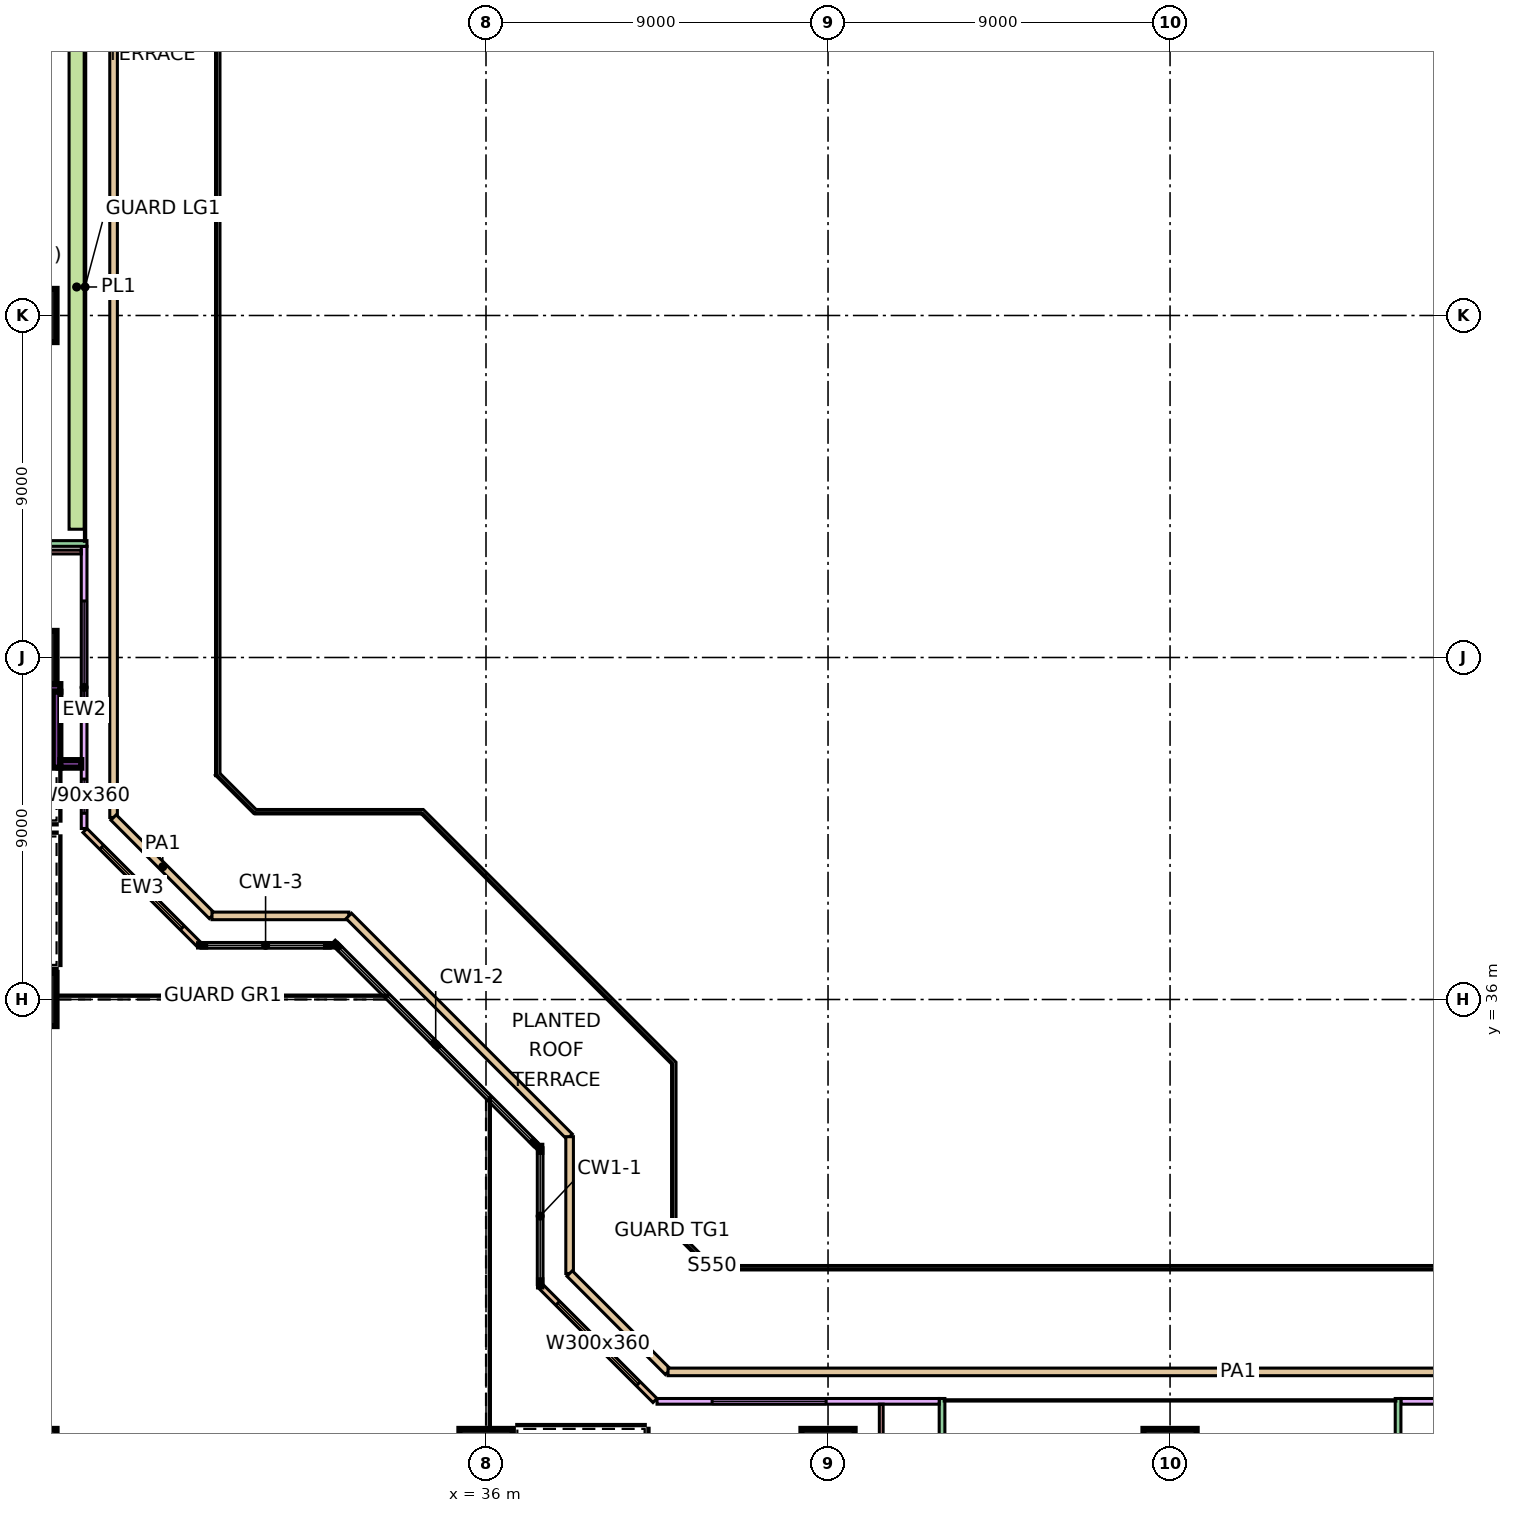
"""IFC4 building model, lengths in metres.
Left out: names, types, materials, properties, quantities, classifications, styles, units other than length and angle.
Written with IfcOpenShell. Run it as: python <this file> out.ifc"""

import sys

from ifc_helpers import new_model, si_unit, direction, frame, frame_2d, origin, origin_2d, place, context, subcontext, project, spatial, rectangle, extrude, element, fill, save


model = new_model("IFC4")
c1 = context("Model", 3, precision=1e-05, world=origin(), true_north=direction((0.0, 1.0)))
c2 = subcontext(c1, "Body", "Model", "MODEL_VIEW")
j1 = project(units=[si_unit("LENGTHUNIT", "METRE"), si_unit("PLANEANGLEUNIT", "RADIAN")], contexts=[c1])
p1 = place(None, origin())
s1 = spatial("IfcSite", under=j1, at=p1, CompositionType="ELEMENT")
p2 = place(p1, origin())
s2 = spatial("IfcBuilding", under=s1, at=p2, CompositionType="ELEMENT")
p3 = place(p2, frame((0.0, 0.0, 35.4)))
s3 = spatial("IfcBuildingStorey", under=s2, at=p3, CompositionType="ELEMENT", Elevation=35.4)
for number, where, z_axis, x_axis in (
    (1, (24.0, 24.0, 0.0), (0.0, 0.0, 1.0), (1.0, 0.0, 0.0)),
    (2, (24.0, 36.0, 0.0), (0.0, 0.0, 1.0), (1.0, 0.0, 0.0)),
    (3, (24.0, 45.0, 0.0), (0.0, 0.0, 1.0), (1.0, 0.0, 0.0)),
    (4, (24.0, 54.0, 0.0), (0.0, 0.0, 1.0), (1.0, 0.0, 0.0)),
    (5, (36.0, 24.0, 0.0), (0.0, 0.0, 1.0), (1.0, 0.0, 0.0)),
    (6, (45.0, 24.0, 0.0), (0.0, 0.0, 1.0), (1.0, 0.0, 0.0)),
    (7, (54.0, 24.0, 0.0), (0.0, 0.0, 1.0), (1.0, 0.0, 0.0)),
):
    element("IfcColumn", number, at=place(p3, frame(where, z_axis=z_axis, x_axis=x_axis)), inside=s3, PredefinedType="COLUMN", context=c2, shape_type="SweptSolid", body=[
        extrude(rectangle(XDim=1.4, YDim=1.4, at=origin_2d()), origin(), (0.0, 0.0, 1.0), 6.0),
    ])
p4 = place(p3, frame((70.5, 25.425, 0.0), z_axis=(0.0, 0.0, 1.0), x_axis=(-1.0, 0.0, 0.0)))
e8 = element("IfcWall", 8, at=p4, inside=s3, PredefinedType="SOLIDWALL", context=c2, shape_type="SweptSolid", body=[
    extrude(rectangle(XDim=10.425, YDim=0.15, at=frame_2d((5.212, 0.0))), origin(), (0.0, 0.0, 1.0), 5.6),
])
p5 = place(p4, frame((1.25, 0.0, 0.45)))
e9 = element("IfcOpeningElement", 9, at=p5, cuts=e8, PredefinedType="OPENING", context=c2, shape_type="SweptSolid", body=[
    extrude(rectangle(XDim=3.0, YDim=3.6, at=frame_2d((1.5, 1.8))), frame((0.0, 0.085, 0.0), z_axis=(0.0, -1.0, 0.0), x_axis=(1.0, 0.0, 0.0)), (0.0, 0.0, 1.0), 0.17),
])
p6 = place(p4, frame((6.462, 0.0, 0.45)))
e10 = element("IfcOpeningElement", 10, at=p6, cuts=e8, PredefinedType="OPENING", context=c2, shape_type="SweptSolid", body=[
    extrude(rectangle(XDim=3.0, YDim=3.6, at=frame_2d((1.5, 1.8))), frame((0.0, 0.085, 0.0), z_axis=(0.0, -1.0, 0.0), x_axis=(1.0, 0.0, 0.0)), (0.0, 0.0, 1.0), 0.17),
])
for number, where, z_axis, x_axis in (
    (11, (60.0, 25.5, 0.0), (0.0, 0.0, 1.0), (0.0, -1.0, 0.0)),
    (12, (48.0, 25.5, 0.0), (0.0, 0.0, 1.0), (0.0, -1.0, 0.0)),
):
    element("IfcWall", number, at=place(p3, frame(where, z_axis=z_axis, x_axis=x_axis)), inside=s3, PredefinedType="SOLIDWALL", context=c2, shape_type="SweptSolid", body=[
        extrude(rectangle(XDim=1.5, YDim=0.15, at=frame_2d((0.75, 0.0))), origin(), (0.0, 0.0, 1.0), 5.6),
    ])
p7 = place(p3, frame((47.925, 25.425, 0.0), z_axis=(0.0, 0.0, 1.0), x_axis=(-1.0, 0.0, 0.0)))
e13 = element("IfcWall", 13, at=p7, inside=s3, PredefinedType="SOLIDWALL", context=c2, shape_type="SweptSolid", body=[
    extrude(rectangle(XDim=7.425, YDim=0.15, at=frame_2d((3.712, 0.0))), origin(), (0.0, 0.0, 1.0), 5.6),
])
p8 = place(p7, frame((2.975, 0.0, 0.45)))
e14 = element("IfcOpeningElement", 14, at=p8, cuts=e13, PredefinedType="OPENING", context=c2, shape_type="SweptSolid", body=[
    extrude(rectangle(XDim=3.0, YDim=3.6, at=frame_2d((1.5, 1.8))), frame((0.0, 0.085, 0.0), z_axis=(0.0, -1.0, 0.0), x_axis=(1.0, 0.0, 0.0)), (0.0, 0.0, 1.0), 0.17),
])
p9 = place(p3, frame((40.447, 25.447, 0.0), z_axis=(0.0, 0.0, 1.0), x_axis=(-0.707106781187, 0.707106781187, 0.0)))
e15 = element("IfcWall", 15, at=p9, inside=s3, PredefinedType="SOLIDWALL", context=c2, shape_type="SweptSolid", body=[
    extrude(rectangle(XDim=4.243, YDim=0.15, at=frame_2d((2.121, 0.0))), origin(), (0.0, 0.0, 1.0), 5.6),
])
p10 = place(p9, frame((0.621, 0.0, 0.45)))
e16 = element("IfcOpeningElement", 16, at=p10, cuts=e15, PredefinedType="OPENING", context=c2, shape_type="SweptSolid", body=[
    extrude(rectangle(XDim=3.0, YDim=3.6, at=frame_2d((1.5, 1.8))), frame((0.0, 0.085, 0.0), z_axis=(0.0, -1.0, 0.0), x_axis=(1.0, 0.0, 0.0)), (0.0, 0.0, 1.0), 0.17),
])
p11 = place(p3, frame((28.447, 37.447, 0.0), z_axis=(0.0, 0.0, 1.0), x_axis=(-0.707106781187, 0.707106781187, 0.0)))
e17 = element("IfcWall", 17, at=p11, inside=s3, PredefinedType="SOLIDWALL", context=c2, shape_type="SweptSolid", body=[
    extrude(rectangle(XDim=4.243, YDim=0.15, at=frame_2d((2.121, 0.0))), origin(), (0.0, 0.0, 1.0), 5.6),
])
p12 = place(p11, frame((0.621, 0.0, 0.45)))
e18 = element("IfcOpeningElement", 18, at=p12, cuts=e17, PredefinedType="OPENING", context=c2, shape_type="SweptSolid", body=[
    extrude(rectangle(XDim=3.0, YDim=3.6, at=frame_2d((1.5, 1.8))), frame((0.0, 0.085, 0.0), z_axis=(0.0, -1.0, 0.0), x_axis=(1.0, 0.0, 0.0)), (0.0, 0.0, 1.0), 0.17),
])
p13 = place(p3, frame((25.425, 40.5, 0.0), z_axis=(0.0, 0.0, 1.0), x_axis=(0.0, 1.0, 0.0)))
e19 = element("IfcWall", 19, at=p13, inside=s3, PredefinedType="SOLIDWALL", context=c2, shape_type="SweptSolid", body=[
    extrude(rectangle(XDim=7.425, YDim=0.15, at=frame_2d((3.712, 0.0))), origin(), (0.0, 0.0, 1.0), 5.6),
])
p14 = place(p13, frame((0.4, 0.0, 0.45)))
e20 = element("IfcOpeningElement", 20, at=p14, cuts=e19, PredefinedType="OPENING", context=c2, shape_type="SweptSolid", body=[
    extrude(rectangle(XDim=0.9, YDim=3.6, at=frame_2d((0.45, 1.8))), frame((0.0, 0.085, 0.0), z_axis=(0.0, -1.0, 0.0), x_axis=(1.0, 0.0, 0.0)), (0.0, 0.0, 1.0), 0.17),
])
p15 = place(p13, frame((2.988, 0.0, 0.45)))
e21 = element("IfcOpeningElement", 21, at=p15, cuts=e19, PredefinedType="OPENING", context=c2, shape_type="SweptSolid", body=[
    extrude(rectangle(XDim=3.0, YDim=3.6, at=frame_2d((1.5, 1.8))), frame((0.0, 0.085, 0.0), z_axis=(0.0, -1.0, 0.0), x_axis=(1.0, 0.0, 0.0)), (0.0, 0.0, 1.0), 0.17),
])
p16 = place(p3, frame((25.5, 48.0, 0.0), z_axis=(0.0, 0.0, 1.0), x_axis=(-1.0, 0.0, 0.0)))
e22 = element("IfcWall", 22, at=p16, inside=s3, PredefinedType="SOLIDWALL", context=c2, shape_type="SweptSolid", body=[
    extrude(rectangle(XDim=1.5, YDim=0.15, at=frame_2d((0.75, 0.0))), origin(), (0.0, 0.0, 1.0), 5.6),
])
p17 = place(p3, frame((25.229, 48.375, 0.0), z_axis=(0.0, 0.0, 1.0), x_axis=(0.0, 1.0, 0.0)))
e23 = element("IfcWall", 23, at=p17, inside=s3, PredefinedType="SOLIDWALL", context=c2, shape_type="SweptSolid", body=[
    extrude(rectangle(XDim=12.75, YDim=0.4, at=frame_2d((6.375, 0.0))), origin(), (0.0, 0.0, 1.0), 0.7),
])
p18 = place(p3, frame((26.2, 61.79, 0.0), z_axis=(0.0, 0.0, 1.0), x_axis=(0.0, -1.0, 0.0)))
e24 = element("IfcWall", 24, at=p18, inside=s3, PredefinedType="PARAPET", context=c2, shape_type="SweptSolid", body=[
    extrude(rectangle(XDim=21.0, YDim=0.2, at=frame_2d((10.5, 0.0))), origin(), (0.0, 0.0, 1.0), 0.5),
])
p19 = place(p3, frame((26.2, 40.79, 0.0), z_axis=(0.0, 0.0, 1.0), x_axis=(0.707106781187, -0.707106781187, 0.0)))
e25 = element("IfcWall", 25, at=p19, inside=s3, PredefinedType="PARAPET", context=c2, shape_type="SweptSolid", body=[
    extrude(rectangle(XDim=3.663, YDim=0.2, at=frame_2d((1.832, 0.0))), origin(), (0.0, 0.0, 1.0), 0.5),
])
p20 = place(p3, frame((28.79, 38.2, 0.0), z_axis=(0.0, 0.0, 1.0), x_axis=(1.0, 0.0, 0.0)))
e26 = element("IfcWall", 26, at=p20, inside=s3, PredefinedType="PARAPET", context=c2, shape_type="SweptSolid", body=[
    extrude(rectangle(XDim=3.6, YDim=0.2, at=frame_2d((1.8, 0.0))), origin(), (0.0, 0.0, 1.0), 0.5),
])
p21 = place(p3, frame((32.39, 38.2, 0.0), z_axis=(0.0, 0.0, 1.0), x_axis=(0.707106781187, -0.707106781187, 0.0)))
e27 = element("IfcWall", 27, at=p21, inside=s3, PredefinedType="PARAPET", context=c2, shape_type="SweptSolid", body=[
    extrude(rectangle(XDim=8.217, YDim=0.2, at=frame_2d((4.108, 0.0))), origin(), (0.0, 0.0, 1.0), 0.5),
])
p22 = place(p3, frame((38.2, 32.39, 0.0), z_axis=(0.0, 0.0, 1.0), x_axis=(0.0, -1.0, 0.0)))
e28 = element("IfcWall", 28, at=p22, inside=s3, PredefinedType="PARAPET", context=c2, shape_type="SweptSolid", body=[
    extrude(rectangle(XDim=3.6, YDim=0.2, at=frame_2d((1.8, 0.0))), origin(), (0.0, 0.0, 1.0), 0.5),
])
p23 = place(p3, frame((38.2, 28.79, 0.0), z_axis=(0.0, 0.0, 1.0), x_axis=(0.707106781187, -0.707106781187, 0.0)))
e29 = element("IfcWall", 29, at=p23, inside=s3, PredefinedType="PARAPET", context=c2, shape_type="SweptSolid", body=[
    extrude(rectangle(XDim=3.663, YDim=0.2, at=frame_2d((1.832, 0.0))), origin(), (0.0, 0.0, 1.0), 0.5),
])
p24 = place(p3, frame((40.79, 26.2, 0.0), z_axis=(0.0, 0.0, 1.0), x_axis=(1.0, 0.0, 0.0)))
e30 = element("IfcWall", 30, at=p24, inside=s3, PredefinedType="PARAPET", context=c2, shape_type="SweptSolid", body=[
    extrude(rectangle(XDim=30.0, YDim=0.2, at=frame_2d((15.0, 0.0))), origin(), (0.0, 0.0, 1.0), 0.5),
])
p25 = place(p3, frame((15.1, 44.2, 0.0), z_axis=(0.0, 0.0, 1.0), x_axis=(1.0, 0.0, 0.0)))
e31 = element("IfcWall", 31, at=p25, inside=s3, PredefinedType="SOLIDWALL", context=c2, shape_type="SweptSolid", body=[
    extrude(rectangle(XDim=9.7, YDim=0.2, at=frame_2d((4.85, 0.0))), origin(), (0.0, 0.0, 1.0), 5.6),
])
p26 = place(p3, frame((22.6, 47.775, 0.0), z_axis=(0.0, 0.0, 1.0), x_axis=(1.0, 0.0, 0.0)))
e32 = element("IfcWall", 32, at=p26, inside=s3, PredefinedType="PARTITIONING", context=c2, shape_type="SweptSolid", body=[
    extrude(rectangle(XDim=2.751, YDim=0.1, at=frame_2d((1.375, 0.0))), origin(), (0.0, 0.0, 1.0), 5.6),
])
p27 = place(p3, frame((24.7, 42.1, 0.0), z_axis=(0.0, 0.0, 1.0), x_axis=(0.0, 1.0, 0.0)))
e33 = element("IfcWall", 33, at=p27, inside=s3, PredefinedType="SOLIDWALL", context=c2, shape_type="SweptSolid", body=[
    extrude(rectangle(XDim=2.0, YDim=0.2, at=frame_2d((1.0, 0.0))), origin(), (0.0, 0.0, 1.0), 5.6),
])
p28 = place(p3, frame((24.8, 42.2, 0.0), z_axis=(0.0, 0.0, 1.0), x_axis=(1.0, 0.0, 0.0)))
e34 = element("IfcWall", 34, at=p28, inside=s3, PredefinedType="SOLIDWALL", context=c2, shape_type="SweptSolid", body=[
    extrude(rectangle(XDim=0.551, YDim=0.2, at=frame_2d((0.275, 0.0))), origin(), (0.0, 0.0, 1.0), 5.6),
])
p29 = place(p3, frame((46.4, 22.6, 0.0), z_axis=(0.0, 0.0, 1.0), x_axis=(0.0, 1.0, 0.0)))
e35 = element("IfcWall", 35, at=p29, inside=s3, PredefinedType="PARTITIONING", context=c2, shape_type="SweptSolid", body=[
    extrude(rectangle(XDim=2.751, YDim=0.1, at=frame_2d((1.375, 0.0))), origin(), (0.0, 0.0, 1.0), 5.6),
])
p30 = place(p8, origin())
e36 = element("IfcWindow", 36, at=p30, inside=s3, PartitioningType="SINGLE_PANEL", PredefinedType="WINDOW", context=c2, shape_type="SweptSolid", body=[
    extrude(rectangle(XDim=3.0, YDim=3.6, at=frame_2d((1.5, 1.8))), frame((0.0, 0.03, 0.0), z_axis=(0.0, -1.0, 0.0), x_axis=(1.0, 0.0, 0.0)), (0.0, 0.0, 1.0), 0.06),
])
fill(e14, e36)
p31 = place(p10, origin())
e37 = element("IfcWindow", 37, at=p31, inside=s3, PartitioningType="SINGLE_PANEL", PredefinedType="WINDOW", context=c2, shape_type="SweptSolid", body=[
    extrude(rectangle(XDim=3.0, YDim=3.6, at=frame_2d((1.5, 1.8))), frame((0.0, 0.03, 0.0), z_axis=(0.0, -1.0, 0.0), x_axis=(1.0, 0.0, 0.0)), (0.0, 0.0, 1.0), 0.06),
])
fill(e16, e37)
p32 = place(p12, origin())
e38 = element("IfcWindow", 38, at=p32, inside=s3, PartitioningType="SINGLE_PANEL", PredefinedType="WINDOW", context=c2, shape_type="SweptSolid", body=[
    extrude(rectangle(XDim=3.0, YDim=3.6, at=frame_2d((1.5, 1.8))), frame((0.0, 0.03, 0.0), z_axis=(0.0, -1.0, 0.0), x_axis=(1.0, 0.0, 0.0)), (0.0, 0.0, 1.0), 0.06),
])
fill(e18, e38)
p33 = place(p14, origin())
e39 = element("IfcWindow", 39, at=p33, inside=s3, PartitioningType="SINGLE_PANEL", PredefinedType="WINDOW", context=c2, shape_type="SweptSolid", body=[
    extrude(rectangle(XDim=0.9, YDim=3.6, at=frame_2d((0.45, 1.8))), frame((0.0, 0.03, 0.0), z_axis=(0.0, -1.0, 0.0), x_axis=(1.0, 0.0, 0.0)), (0.0, 0.0, 1.0), 0.06),
])
fill(e20, e39)
p34 = place(p15, origin())
e40 = element("IfcWindow", 40, at=p34, inside=s3, PartitioningType="SINGLE_PANEL", PredefinedType="WINDOW", context=c2, shape_type="SweptSolid", body=[
    extrude(rectangle(XDim=3.0, YDim=3.6, at=frame_2d((1.5, 1.8))), frame((0.0, 0.03, 0.0), z_axis=(0.0, -1.0, 0.0), x_axis=(1.0, 0.0, 0.0)), (0.0, 0.0, 1.0), 0.06),
])
fill(e21, e40)
save(model, sys.argv[1])
